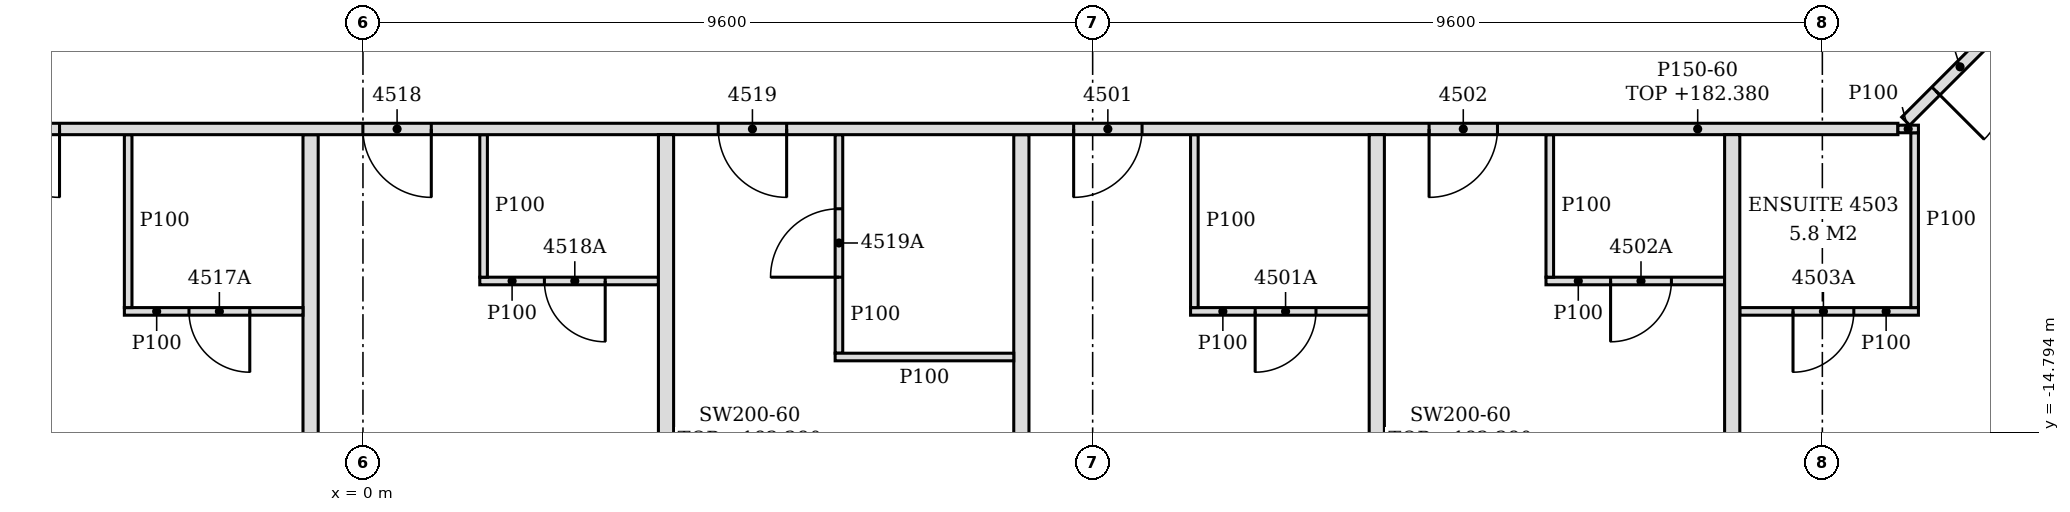
"""IFC4 building model, lengths in metres.
Left out: names, types, materials, properties, quantities, classifications, styles, units other than length and angle.
Written with IfcOpenShell. Run it as: python <this file> out.ifc"""

import sys

from ifc_helpers import new_model, si_unit, direction, frame, frame_2d, origin, place, context, subcontext, project, spatial, polyline, rectangle, outline, extrude, element, fill, save


model = new_model("IFC4")
c1 = context("Model", 3, precision=1e-05, world=origin(), true_north=direction((0.0, 1.0)))
c2 = subcontext(c1, "Body", "Model", "MODEL_VIEW")
j1 = project(units=[si_unit("LENGTHUNIT", "METRE"), si_unit("PLANEANGLEUNIT", "RADIAN")], contexts=[c1])
p1 = place(None, origin())
s1 = spatial("IfcSite", under=j1, at=p1, CompositionType="ELEMENT")
p2 = place(p1, origin())
s2 = spatial("IfcBuilding", under=s1, at=p2, CompositionType="ELEMENT")
p3 = place(p2, frame((0.0, 0.0, 179.4)))
s3 = spatial("IfcBuildingStorey", under=s2, at=p3, CompositionType="ELEMENT", Elevation=179.4)
for number, where, z_axis, x_axis in (
    (1, (-0.689, -19.42, 0.0), (0.0, 0.0, 1.0), (0.0, 1.0, 0.0)),
    (2, (8.662, -19.42, 0.0), (0.0, 0.0, 1.0), (0.0, 1.0, 0.0)),
    (3, (18.014, -19.42, 0.0), (0.0, 0.0, 1.0), (0.0, 1.0, 0.0)),
):
    element("IfcWall", number, at=place(p3, frame(where, z_axis=z_axis, x_axis=x_axis)), inside=s3, PredefinedType="PARTITIONING", context=c2, shape_type="SweptSolid", body=[
        extrude(outline(polyline([(0.0, 0.0), (8.545, 0.0), (8.545, 2.88), (8.365, 2.88), (8.363, 3.45), (3.775, 3.45), (3.773, 2.88), (3.565, 2.88), (3.563, 3.45), (0.0, 3.45), (0.0, 0.0)])), frame((0.0, 0.1, 0.0), z_axis=(0.0, -1.0, 0.0), x_axis=(1.0, 0.0, 0.0)), (0.0, 0.0, 1.0), 0.2),
    ])
p4 = place(p3, frame((3.987, -19.182, 0.0), z_axis=(0.0, 0.0, 1.0), x_axis=(0.0, 1.0, 0.0)))
e4 = element("IfcWall", 4, at=p4, inside=s3, PredefinedType="PARTITIONING", context=c2, shape_type="SweptSolid", body=[
    extrude(outline(polyline([(0.334, 0.0), (8.307, 0.0), (8.307, 0.863), (8.307, 1.725), (8.307, 2.588), (8.307, 2.88), (0.0, 2.88), (0.0, 2.588), (0.319, 1.725), (0.334, 0.863), (0.334, 0.0)])), frame((0.0, 0.1, 0.0), z_axis=(0.0, -1.0, 0.0), x_axis=(1.0, 0.0, 0.0)), (0.0, 0.0, 1.0), 0.2),
])
p5 = place(p3, frame((13.338, -19.182, 0.0), z_axis=(0.0, 0.0, 1.0), x_axis=(0.0, 1.0, 0.0)))
e5 = element("IfcWall", 5, at=p5, inside=s3, PredefinedType="PARTITIONING", context=c2, shape_type="SweptSolid", body=[
    extrude(outline(polyline([(0.335, 0.0), (8.307, 0.0), (8.307, 0.863), (8.307, 1.725), (8.307, 2.588), (8.307, 2.88), (0.0, 2.88), (0.0, 2.588), (0.319, 1.725), (0.335, 0.863), (0.335, 0.0)])), frame((0.0, 0.1, 0.0), z_axis=(0.0, -1.0, 0.0), x_axis=(1.0, 0.0, 0.0)), (0.0, 0.0, 1.0), 0.2),
])
p6 = place(p3, frame((6.212, -13.8, 0.0), z_axis=(0.0, 0.0, 1.0), x_axis=(1.0, 0.0, 0.0)))
e6 = element("IfcWall", 6, at=p6, inside=s3, PredefinedType="PARTITIONING", context=c2, shape_type="SweptSolid", body=[
    extrude(outline(polyline([(0.0, 0.0), (2.35, 0.0), (2.35, 3.45), (1.138, 3.45), (1.136, 2.83), (0.838, 2.83), (0.836, 3.45), (0.0, 3.45), (0.0, 0.0)])), frame((0.0, 0.05, 0.0), z_axis=(0.0, -1.0, 0.0), x_axis=(1.0, 0.0, 0.0)), (0.0, 0.0, 1.0), 0.1),
])
p7 = place(p3, frame((6.262, -13.75, 0.0), z_axis=(0.0, 0.0, 1.0), x_axis=(0.0, 1.0, 0.0)))
e7 = element("IfcWall", 7, at=p7, inside=s3, PredefinedType="PARTITIONING", context=c2, shape_type="SweptSolid", body=[
    extrude(outline(polyline([(0.0, 0.0), (2.875, 0.0), (2.875, 2.88), (2.695, 2.88), (2.693, 3.45), (0.0, 3.45), (0.0, 0.0)])), frame((0.0, 0.05, 0.0), z_axis=(0.0, -1.0, 0.0), x_axis=(1.0, 0.0, 0.0)), (0.0, 0.0, 1.0), 0.1),
])
p8 = place(p7, frame((1.0, 0.0, 0.0)))
e8 = element("IfcOpeningElement", 8, at=p8, cuts=e7, PredefinedType="OPENING", context=c2, shape_type="SweptSolid", body=[
    extrude(rectangle(XDim=0.9, YDim=2.1, at=frame_2d((0.45, 1.05))), frame((0.0, 0.06, 0.0), z_axis=(0.0, -1.0, 0.0), x_axis=(1.0, 0.0, 0.0)), (0.0, 0.0, 1.0), 0.12),
])
p9 = place(p3, frame((-3.139, -13.2, 0.0), z_axis=(0.0, 0.0, 1.0), x_axis=(1.0, 0.0, 0.0)))
e9 = element("IfcWall", 9, at=p9, inside=s3, PredefinedType="PARTITIONING", context=c2, shape_type="SweptSolid", body=[
    extrude(rectangle(XDim=2.35, YDim=0.1, at=frame_2d((1.175, 0.0))), origin(), (0.0, 0.0, 1.0), 3.45),
])
p10 = place(p9, frame((0.85, 0.0, 0.0)))
e10 = element("IfcOpeningElement", 10, at=p10, cuts=e9, PredefinedType="OPENING", context=c2, shape_type="SweptSolid", body=[
    extrude(rectangle(XDim=0.8, YDim=2.1, at=frame_2d((0.4, 1.05))), frame((0.0, 0.06, 0.0), z_axis=(0.0, -1.0, 0.0), x_axis=(1.0, 0.0, 0.0)), (0.0, 0.0, 1.0), 0.12),
])
p11 = place(p3, frame((-3.089, -13.15, 0.0), z_axis=(0.0, 0.0, 1.0), x_axis=(0.0, 1.0, 0.0)))
e11 = element("IfcWall", 11, at=p11, inside=s3, PredefinedType="PARTITIONING", context=c2, shape_type="SweptSolid", body=[
    extrude(outline(polyline([(0.0, 0.0), (2.275, 0.0), (2.275, 2.88), (2.095, 2.88), (2.093, 3.45), (0.0, 3.45), (0.0, 0.0)])), frame((0.0, 0.05, 0.0), z_axis=(0.0, -1.0, 0.0), x_axis=(1.0, 0.0, 0.0)), (0.0, 0.0, 1.0), 0.1),
])
p12 = place(p3, frame((10.888, -13.2, 0.0), z_axis=(0.0, 0.0, 1.0), x_axis=(1.0, 0.0, 0.0)))
e12 = element("IfcWall", 12, at=p12, inside=s3, PredefinedType="PARTITIONING", context=c2, shape_type="SweptSolid", body=[
    extrude(rectangle(XDim=2.35, YDim=0.1, at=frame_2d((1.175, 0.0))), origin(), (0.0, 0.0, 1.0), 3.45),
])
p13 = place(p12, frame((0.85, 0.0, 0.0)))
e13 = element("IfcOpeningElement", 13, at=p13, cuts=e12, PredefinedType="OPENING", context=c2, shape_type="SweptSolid", body=[
    extrude(rectangle(XDim=0.8, YDim=2.1, at=frame_2d((0.4, 1.05))), frame((0.0, 0.06, 0.0), z_axis=(0.0, -1.0, 0.0), x_axis=(1.0, 0.0, 0.0)), (0.0, 0.0, 1.0), 0.12),
])
p14 = place(p3, frame((10.938, -13.15, 0.0), z_axis=(0.0, 0.0, 1.0), x_axis=(0.0, 1.0, 0.0)))
e14 = element("IfcWall", 14, at=p14, inside=s3, PredefinedType="PARTITIONING", context=c2, shape_type="SweptSolid", body=[
    extrude(outline(polyline([(0.0, 0.0), (2.275, 0.0), (2.275, 2.88), (2.095, 2.88), (2.093, 3.45), (0.0, 3.45), (0.0, 0.0)])), frame((0.0, 0.05, 0.0), z_axis=(0.0, -1.0, 0.0), x_axis=(1.0, 0.0, 0.0)), (0.0, 0.0, 1.0), 0.1),
])
p15 = place(p3, frame((18.114, -13.2, 0.0), z_axis=(0.0, 0.0, 1.0), x_axis=(1.0, 0.0, 0.0)))
e15 = element("IfcWall", 15, at=p15, inside=s3, PredefinedType="PARTITIONING", context=c2, shape_type="SweptSolid", body=[
    extrude(outline(polyline([(0.0, 0.0), (2.35, 0.0), (2.35, 3.45), (1.236, 3.45), (1.234, 2.83), (0.936, 2.83), (0.934, 3.45), (0.0, 3.45), (0.0, 0.0)])), frame((0.0, 0.05, 0.0), z_axis=(0.0, -1.0, 0.0), x_axis=(1.0, 0.0, 0.0)), (0.0, 0.0, 1.0), 0.1),
])
p16 = place(p15, frame((0.7, 0.0, 0.0)))
e16 = element("IfcOpeningElement", 16, at=p16, cuts=e15, PredefinedType="OPENING", context=c2, shape_type="SweptSolid", body=[
    extrude(rectangle(XDim=0.8, YDim=2.1, at=frame_2d((0.4, 1.05))), frame((0.0, 0.06, 0.0), z_axis=(0.0, -1.0, 0.0), x_axis=(1.0, 0.0, 0.0)), (0.0, 0.0, 1.0), 0.12),
])
p17 = place(p3, frame((20.414, -13.15, 0.0), z_axis=(0.0, 0.0, 1.0), x_axis=(0.0, 1.0, 0.0)))
e17 = element("IfcWall", 17, at=p17, inside=s3, PredefinedType="PARTITIONING", context=c2, shape_type="SweptSolid", body=[
    extrude(outline(polyline([(0.0, 0.0), (2.3, 0.0), (2.3, 2.88), (2.095, 2.88), (2.093, 3.45), (0.0, 3.45), (0.0, 0.0)])), frame((0.0, 0.05, 0.0), z_axis=(0.0, -1.0, 0.0), x_axis=(1.0, 0.0, 0.0)), (0.0, 0.0, 1.0), 0.1),
])
p18 = place(p3, frame((1.537, -12.8, 0.0), z_axis=(0.0, 0.0, 1.0), x_axis=(1.0, 0.0, 0.0)))
e18 = element("IfcWall", 18, at=p18, inside=s3, PredefinedType="PARTITIONING", context=c2, shape_type="SweptSolid", body=[
    extrude(rectangle(XDim=2.35, YDim=0.1, at=frame_2d((1.175, 0.0))), origin(), (0.0, 0.0, 1.0), 3.45),
])
p19 = place(p18, frame((0.85, 0.0, 0.0)))
e19 = element("IfcOpeningElement", 19, at=p19, cuts=e18, PredefinedType="OPENING", context=c2, shape_type="SweptSolid", body=[
    extrude(rectangle(XDim=0.8, YDim=2.1, at=frame_2d((0.4, 1.05))), frame((0.0, 0.06, 0.0), z_axis=(0.0, -1.0, 0.0), x_axis=(1.0, 0.0, 0.0)), (0.0, 0.0, 1.0), 0.12),
])
p20 = place(p3, frame((1.587, -12.75, 0.0), z_axis=(0.0, 0.0, 1.0), x_axis=(0.0, 1.0, 0.0)))
e20 = element("IfcWall", 20, at=p20, inside=s3, PredefinedType="PARTITIONING", context=c2, shape_type="SweptSolid", body=[
    extrude(outline(polyline([(0.0, 0.0), (1.875, 0.0), (1.875, 2.88), (1.695, 2.88), (1.693, 3.45), (0.0, 3.45), (0.0, 0.0)])), frame((0.0, 0.05, 0.0), z_axis=(0.0, -1.0, 0.0), x_axis=(1.0, 0.0, 0.0)), (0.0, 0.0, 1.0), 0.1),
])
p21 = place(p3, frame((15.564, -12.8, 0.0), z_axis=(0.0, 0.0, 1.0), x_axis=(1.0, 0.0, 0.0)))
e21 = element("IfcWall", 21, at=p21, inside=s3, PredefinedType="PARTITIONING", context=c2, shape_type="SweptSolid", body=[
    extrude(rectangle(XDim=2.35, YDim=0.1, at=frame_2d((1.175, 0.0))), origin(), (0.0, 0.0, 1.0), 3.45),
])
p22 = place(p21, frame((0.85, 0.0, 0.0)))
e22 = element("IfcOpeningElement", 22, at=p22, cuts=e21, PredefinedType="OPENING", context=c2, shape_type="SweptSolid", body=[
    extrude(rectangle(XDim=0.8, YDim=2.1, at=frame_2d((0.4, 1.05))), frame((0.0, 0.06, 0.0), z_axis=(0.0, -1.0, 0.0), x_axis=(1.0, 0.0, 0.0)), (0.0, 0.0, 1.0), 0.12),
])
p23 = place(p3, frame((15.614, -12.75, 0.0), z_axis=(0.0, 0.0, 1.0), x_axis=(0.0, 1.0, 0.0)))
e23 = element("IfcWall", 23, at=p23, inside=s3, PredefinedType="PARTITIONING", context=c2, shape_type="SweptSolid", body=[
    extrude(outline(polyline([(0.0, 0.0), (1.875, 0.0), (1.875, 2.88), (1.695, 2.88), (1.693, 3.45), (0.0, 3.45), (0.0, 0.0)])), frame((0.0, 0.05, 0.0), z_axis=(0.0, -1.0, 0.0), x_axis=(1.0, 0.0, 0.0)), (0.0, 0.0, 1.0), 0.1),
])
p24 = place(p3, frame((-5.9, -10.8, 0.0), z_axis=(0.0, 0.0, 1.0), x_axis=(1.0, 0.0, 0.0)))
e24 = element("IfcWall", 24, at=p24, inside=s3, PredefinedType="PARTITIONING", context=c2, shape_type="SweptSolid", body=[
    extrude(outline(polyline([(0.0, 0.0), (26.094, 0.0), (26.094, 2.88), (25.25, 2.88), (25.248, 2.83), (24.95, 2.83), (24.948, 2.88), (13.25, 2.88), (13.248, 2.83), (12.95, 2.83), (12.948, 2.88), (1.25, 2.88), (1.248, 2.83), (0.95, 2.83), (0.948, 2.98), (0.0, 2.98), (0.0, 0.0)])), frame((0.0, 0.075, 0.0), z_axis=(0.0, -1.0, 0.0), x_axis=(1.0, 0.0, 0.0)), (0.0, 0.0, 1.0), 0.15),
])
p25 = place(p24, frame((15.25, 0.0, 0.0)))
e25 = element("IfcOpeningElement", 25, at=p25, cuts=e24, PredefinedType="OPENING", context=c2, shape_type="SweptSolid", body=[
    extrude(rectangle(XDim=0.9, YDim=2.1, at=frame_2d((0.45, 1.05))), frame((0.0, 0.085, 0.0), z_axis=(0.0, -1.0, 0.0), x_axis=(1.0, 0.0, 0.0)), (0.0, 0.0, 1.0), 0.17),
])
p26 = place(p24, frame((19.926, 0.0, 0.0)))
e26 = element("IfcOpeningElement", 26, at=p26, cuts=e24, PredefinedType="OPENING", context=c2, shape_type="SweptSolid", body=[
    extrude(rectangle(XDim=0.9, YDim=2.1, at=frame_2d((0.45, 1.05))), frame((0.0, 0.085, 0.0), z_axis=(0.0, -1.0, 0.0), x_axis=(1.0, 0.0, 0.0)), (0.0, 0.0, 1.0), 0.17),
])
p27 = place(p24, frame((1.008, 0.0, 0.0)))
e27 = element("IfcOpeningElement", 27, at=p27, cuts=e24, PredefinedType="OPENING", context=c2, shape_type="SweptSolid", body=[
    extrude(rectangle(XDim=0.9, YDim=2.1, at=frame_2d((0.45, 1.05))), frame((0.0, 0.085, 0.0), z_axis=(0.0, -1.0, 0.0), x_axis=(1.0, 0.0, 0.0)), (0.0, 0.0, 1.0), 0.17),
])
p28 = place(p24, frame((5.899, 0.0, 0.0)))
e28 = element("IfcOpeningElement", 28, at=p28, cuts=e24, PredefinedType="OPENING", context=c2, shape_type="SweptSolid", body=[
    extrude(rectangle(XDim=0.9, YDim=2.1, at=frame_2d((0.45, 1.05))), frame((0.0, 0.085, 0.0), z_axis=(0.0, -1.0, 0.0), x_axis=(1.0, 0.0, 0.0)), (0.0, 0.0, 1.0), 0.17),
])
p29 = place(p24, frame((10.574, 0.0, 0.0)))
e29 = element("IfcOpeningElement", 29, at=p29, cuts=e24, PredefinedType="OPENING", context=c2, shape_type="SweptSolid", body=[
    extrude(rectangle(XDim=0.9, YDim=2.1, at=frame_2d((0.45, 1.05))), frame((0.0, 0.085, 0.0), z_axis=(0.0, -1.0, 0.0), x_axis=(1.0, 0.0, 0.0)), (0.0, 0.0, 1.0), 0.17),
])
p30 = place(p3, frame((20.194, -10.8, 0.0), z_axis=(0.0, 0.0, 1.0), x_axis=(1.0, 0.0, 0.0)))
e30 = element("IfcWall", 30, at=p30, inside=s3, PredefinedType="PARTITIONING", context=c2, shape_type="SweptSolid", body=[
    extrude(rectangle(XDim=0.27, YDim=0.1, at=frame_2d((0.135, 0.0))), origin(), (0.0, 0.0, 1.0), 3.45),
])
p31 = place(p3, frame((20.297, -10.697, 0.0), z_axis=(0.0, 0.0, 1.0), x_axis=(0.707098631462, 0.707114930817, 0.0)))
e31 = element("IfcWall", 31, at=p31, inside=s3, PredefinedType="PARTITIONING", context=c2, shape_type="SweptSolid", body=[
    extrude(rectangle(XDim=14.979, YDim=0.15, at=frame_2d((7.489, 0.0))), origin(), (0.0, 0.0, 1.0), 2.88),
])
p32 = place(p31, frame((0.561, 0.0, 0.0)))
e32 = element("IfcOpeningElement", 32, at=p32, cuts=e31, PredefinedType="OPENING", context=c2, shape_type="SweptSolid", body=[
    extrude(rectangle(XDim=0.9, YDim=2.1, at=frame_2d((0.45, 1.05))), frame((0.0, 0.085, 0.0), z_axis=(0.0, -1.0, 0.0), x_axis=(1.0, 0.0, 0.0)), (0.0, 0.0, 1.0), 0.17),
])
p33 = place(p31, frame((4.986, 0.0, 0.0)))
e33 = element("IfcOpeningElement", 33, at=p33, cuts=e31, PredefinedType="OPENING", context=c2, shape_type="SweptSolid", body=[
    extrude(rectangle(XDim=0.9, YDim=2.1, at=frame_2d((0.45, 1.05))), frame((0.0, 0.085, 0.0), z_axis=(0.0, -1.0, 0.0), x_axis=(1.0, 0.0, 0.0)), (0.0, 0.0, 1.0), 0.17),
])
p34 = place(p31, frame((12.667, 0.0, 0.0)))
e34 = element("IfcOpeningElement", 34, at=p34, cuts=e31, PredefinedType="OPENING", context=c2, shape_type="SweptSolid", body=[
    extrude(rectangle(XDim=0.9, YDim=2.1, at=frame_2d((0.45, 1.05))), frame((0.0, 0.085, 0.0), z_axis=(0.0, -1.0, 0.0), x_axis=(1.0, 0.0, 0.0)), (0.0, 0.0, 1.0), 0.17),
])
p35 = place(p25, frame((0.9, 0.0, 0.0), z_axis=(0.0, 0.0, 1.0), x_axis=(-1.0, 0.0, 0.0)))
e35 = element("IfcDoor", 35, at=p35, inside=s3, OperationType="SINGLE_SWING_RIGHT", PredefinedType="DOOR", context=c2, shape_type="SweptSolid", body=[
    extrude(rectangle(XDim=0.9, YDim=2.1, at=frame_2d((0.45, 1.05))), frame((0.0, 0.025, 0.0), z_axis=(0.0, -1.0, 0.0), x_axis=(1.0, 0.0, 0.0)), (0.0, 0.0, 1.0), 0.05),
])
fill(e25, e35)
p36 = place(p13, frame((0.8, 0.0, 0.0), z_axis=(0.0, 0.0, 1.0), x_axis=(-1.0, 0.0, 0.0)))
e36 = element("IfcDoor", 36, at=p36, inside=s3, OperationType="SINGLE_SWING_RIGHT", PredefinedType="DOOR", context=c2, shape_type="SweptSolid", body=[
    extrude(rectangle(XDim=0.8, YDim=2.1, at=frame_2d((0.4, 1.05))), frame((0.0, 0.025, 0.0), z_axis=(0.0, -1.0, 0.0), x_axis=(1.0, 0.0, 0.0)), (0.0, 0.0, 1.0), 0.05),
])
fill(e13, e36)
p37 = place(p26, frame((0.9, 0.0, 0.0), z_axis=(0.0, 0.0, 1.0), x_axis=(-1.0, 0.0, 0.0)))
e37 = element("IfcDoor", 37, at=p37, inside=s3, OperationType="SINGLE_SWING_RIGHT", PredefinedType="DOOR", context=c2, shape_type="SweptSolid", body=[
    extrude(rectangle(XDim=0.9, YDim=2.1, at=frame_2d((0.45, 1.05))), frame((0.0, 0.025, 0.0), z_axis=(0.0, -1.0, 0.0), x_axis=(1.0, 0.0, 0.0)), (0.0, 0.0, 1.0), 0.05),
])
fill(e26, e37)
p38 = place(p22, frame((0.8, 0.0, 0.0), z_axis=(0.0, 0.0, 1.0), x_axis=(-1.0, 0.0, 0.0)))
e38 = element("IfcDoor", 38, at=p38, inside=s3, OperationType="SINGLE_SWING_RIGHT", PredefinedType="DOOR", context=c2, shape_type="SweptSolid", body=[
    extrude(rectangle(XDim=0.8, YDim=2.1, at=frame_2d((0.4, 1.05))), frame((0.0, 0.025, 0.0), z_axis=(0.0, -1.0, 0.0), x_axis=(1.0, 0.0, 0.0)), (0.0, 0.0, 1.0), 0.05),
])
fill(e22, e38)
p39 = place(p32, frame((0.9, 0.0, 0.0), z_axis=(0.0, 0.0, 1.0), x_axis=(-1.0, 0.0, 0.0)))
e39 = element("IfcDoor", 39, at=p39, inside=s3, OperationType="SINGLE_SWING_RIGHT", PredefinedType="DOOR", context=c2, shape_type="SweptSolid", body=[
    extrude(rectangle(XDim=0.9, YDim=2.1, at=frame_2d((0.45, 1.05))), frame((0.0, 0.025, 0.0), z_axis=(0.0, -1.0, 0.0), x_axis=(1.0, 0.0, 0.0)), (0.0, 0.0, 1.0), 0.05),
])
fill(e32, e39)
p40 = place(p16, frame((0.8, 0.0, 0.0), z_axis=(0.0, 0.0, 1.0), x_axis=(-1.0, 0.0, 0.0)))
e40 = element("IfcDoor", 40, at=p40, inside=s3, OperationType="SINGLE_SWING_RIGHT", PredefinedType="DOOR", context=c2, shape_type="SweptSolid", body=[
    extrude(rectangle(XDim=0.8, YDim=2.1, at=frame_2d((0.4, 1.05))), frame((0.0, 0.025, 0.0), z_axis=(0.0, -1.0, 0.0), x_axis=(1.0, 0.0, 0.0)), (0.0, 0.0, 1.0), 0.05),
])
fill(e16, e40)
p41 = place(p27, frame((0.9, 0.0, 0.0), z_axis=(0.0, 0.0, 1.0), x_axis=(-1.0, 0.0, 0.0)))
e41 = element("IfcDoor", 41, at=p41, inside=s3, OperationType="SINGLE_SWING_LEFT", PredefinedType="DOOR", context=c2, shape_type="SweptSolid", body=[
    extrude(rectangle(XDim=0.9, YDim=2.1, at=frame_2d((0.45, 1.05))), frame((0.0, 0.025, 0.0), z_axis=(0.0, -1.0, 0.0), x_axis=(1.0, 0.0, 0.0)), (0.0, 0.0, 1.0), 0.05),
])
fill(e27, e41)
p42 = place(p10, frame((0.8, 0.0, 0.0), z_axis=(0.0, 0.0, 1.0), x_axis=(-1.0, 0.0, 0.0)))
e42 = element("IfcDoor", 42, at=p42, inside=s3, OperationType="SINGLE_SWING_LEFT", PredefinedType="DOOR", context=c2, shape_type="SweptSolid", body=[
    extrude(rectangle(XDim=0.8, YDim=2.1, at=frame_2d((0.4, 1.05))), frame((0.0, 0.025, 0.0), z_axis=(0.0, -1.0, 0.0), x_axis=(1.0, 0.0, 0.0)), (0.0, 0.0, 1.0), 0.05),
])
fill(e10, e42)
p43 = place(p28, frame((0.9, 0.0, 0.0), z_axis=(0.0, 0.0, 1.0), x_axis=(-1.0, 0.0, 0.0)))
e43 = element("IfcDoor", 43, at=p43, inside=s3, OperationType="SINGLE_SWING_LEFT", PredefinedType="DOOR", context=c2, shape_type="SweptSolid", body=[
    extrude(rectangle(XDim=0.9, YDim=2.1, at=frame_2d((0.45, 1.05))), frame((0.0, 0.025, 0.0), z_axis=(0.0, -1.0, 0.0), x_axis=(1.0, 0.0, 0.0)), (0.0, 0.0, 1.0), 0.05),
])
fill(e28, e43)
p44 = place(p19, frame((0.8, 0.0, 0.0), z_axis=(0.0, 0.0, 1.0), x_axis=(-1.0, 0.0, 0.0)))
e44 = element("IfcDoor", 44, at=p44, inside=s3, OperationType="SINGLE_SWING_LEFT", PredefinedType="DOOR", context=c2, shape_type="SweptSolid", body=[
    extrude(rectangle(XDim=0.8, YDim=2.1, at=frame_2d((0.4, 1.05))), frame((0.0, 0.025, 0.0), z_axis=(0.0, -1.0, 0.0), x_axis=(1.0, 0.0, 0.0)), (0.0, 0.0, 1.0), 0.05),
])
fill(e19, e44)
p45 = place(p29, frame((0.9, 0.0, 0.0), z_axis=(0.0, 0.0, 1.0), x_axis=(-1.0, 0.0, 0.0)))
e45 = element("IfcDoor", 45, at=p45, inside=s3, OperationType="SINGLE_SWING_LEFT", PredefinedType="DOOR", context=c2, shape_type="SweptSolid", body=[
    extrude(rectangle(XDim=0.9, YDim=2.1, at=frame_2d((0.45, 1.05))), frame((0.0, 0.025, 0.0), z_axis=(0.0, -1.0, 0.0), x_axis=(1.0, 0.0, 0.0)), (0.0, 0.0, 1.0), 0.05),
])
fill(e29, e45)
p46 = place(p8, origin())
e46 = element("IfcDoor", 46, at=p46, inside=s3, OperationType="SINGLE_SWING_LEFT", PredefinedType="DOOR", context=c2, shape_type="SweptSolid", body=[
    extrude(rectangle(XDim=0.9, YDim=2.1, at=frame_2d((0.45, 1.05))), frame((0.0, 0.025, 0.0), z_axis=(0.0, -1.0, 0.0), x_axis=(1.0, 0.0, 0.0)), (0.0, 0.0, 1.0), 0.05),
])
fill(e8, e46)
save(model, sys.argv[1])
